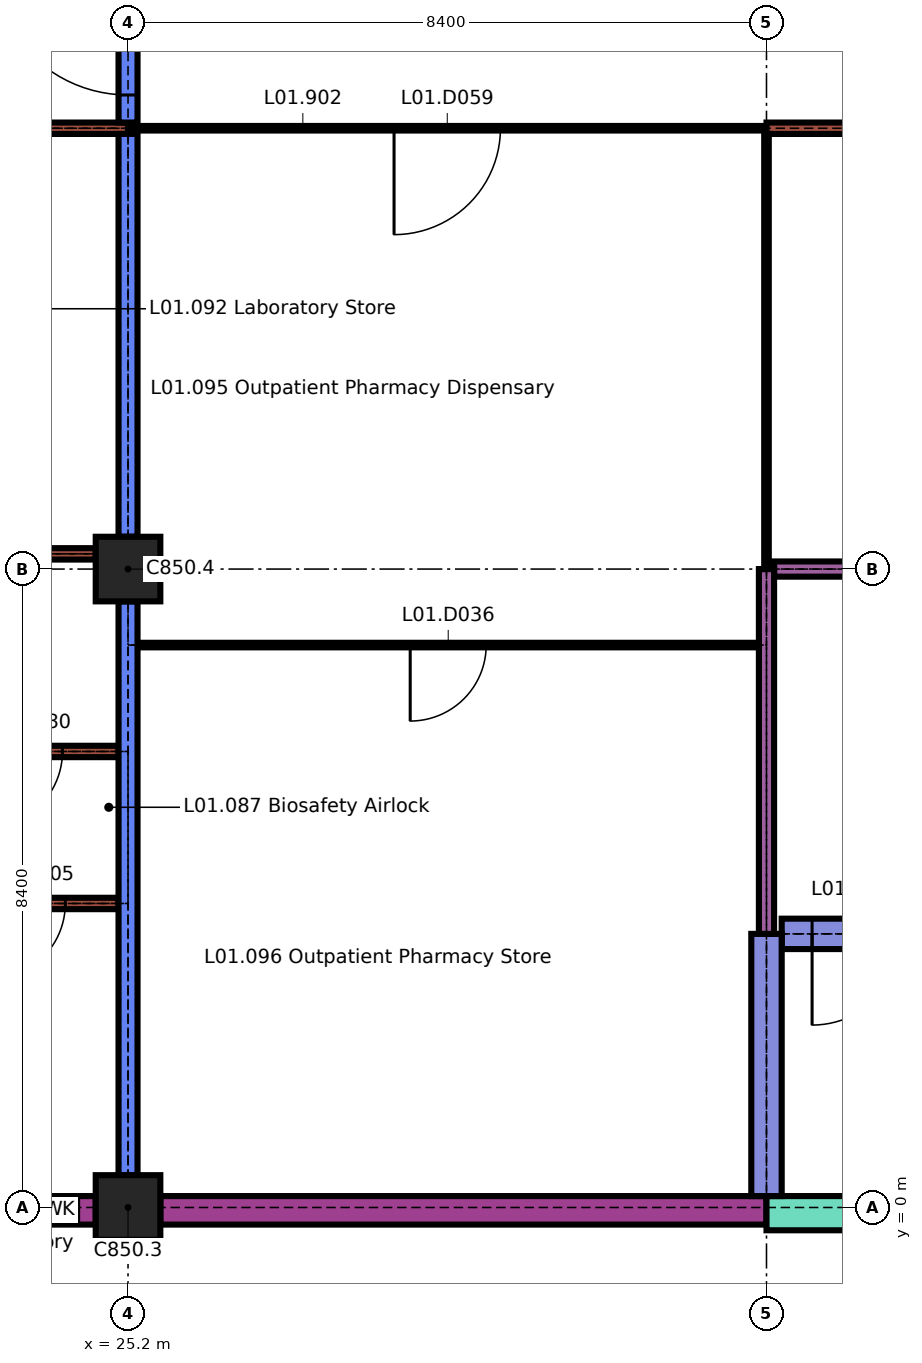
"""IFC4 building model, lengths in metres.
Left out: names, types, materials, properties, quantities, classifications, styles, units other than length and angle.
Written with IfcOpenShell. Run it as: python <this file> out.ifc"""

import sys

from ifc_helpers import new_model, si_unit, direction, frame, frame_2d, origin, origin_2d, place, context, subcontext, project, spatial, rectangle, extrude, element, fill, save


model = new_model("IFC4")
c1 = context("Model", 3, precision=1e-05, world=origin(), true_north=direction((0.0, 1.0)))
c2 = subcontext(c1, "Body", "Model", "MODEL_VIEW")
j1 = project(units=[si_unit("LENGTHUNIT", "METRE"), si_unit("PLANEANGLEUNIT", "RADIAN")], contexts=[c1])
p1 = place(None, origin())
s1 = spatial("IfcSite", under=j1, at=p1, CompositionType="ELEMENT")
p2 = place(p1, origin())
s2 = spatial("IfcBuilding", under=s1, at=p2, CompositionType="ELEMENT")
p3 = place(p2, frame((0.0, 0.0, 4.5)))
s3 = spatial("IfcBuildingStorey", under=s2, at=p3, CompositionType="ELEMENT", Elevation=4.5)
for number, where, z_axis, x_axis in (
    (1, (25.2, 0.0, 0.0), (0.0, 0.0, 1.0), (1.0, 0.0, 0.0)),
    (2, (25.2, 8.4, 0.0), (0.0, 0.0, 1.0), (1.0, 0.0, 0.0)),
):
    element("IfcColumn", number, at=place(p3, frame(where, z_axis=z_axis, x_axis=x_axis)), inside=s3, PredefinedType="COLUMN", context=c2, shape_type="SweptSolid", body=[
        extrude(rectangle(XDim=0.85, YDim=0.85, at=origin_2d()), origin(), (0.0, 0.0, 1.0), 3.45),
    ])
p4 = place(p3, frame((22.6, -0.038, 0.0), z_axis=(0.0, 0.0, 1.0), x_axis=(1.0, 0.0, 0.0)))
e3 = element("IfcWall", 3, at=p4, inside=s3, PredefinedType="SOLIDWALL", context=c2, shape_type="SweptSolid", body=[
    extrude(rectangle(XDim=2.175, YDim=0.375, at=frame_2d((1.087, 0.0))), origin(), (0.0, 0.0, 1.0), 3.15),
])
p5 = place(p4, frame((0.45, 0.0, 1.05)))
e4 = element("IfcOpeningElement", 4, at=p5, cuts=e3, PredefinedType="OPENING", context=c2, shape_type="SweptSolid", body=[
    extrude(rectangle(XDim=1.5, YDim=1.2, at=frame_2d((0.75, 0.6))), frame((0.0, 0.198, 0.0), z_axis=(0.0, -1.0, 0.0), x_axis=(1.0, 0.0, 0.0)), (0.0, 0.0, 1.0), 0.395),
])
p6 = place(p3, frame((25.625, -0.038, 0.0), z_axis=(0.0, 0.0, 1.0), x_axis=(1.0, 0.0, 0.0)))
e5 = element("IfcWall", 5, at=p6, inside=s3, PredefinedType="SOLIDWALL", context=c2, shape_type="SweptSolid", body=[
    extrude(rectangle(XDim=7.975, YDim=0.375, at=frame_2d((3.988, 0.0))), origin(), (0.0, 0.0, 1.0), 3.15),
])
p7 = place(p3, frame((33.6, -0.075, 0.0), z_axis=(0.0, 0.0, 1.0), x_axis=(1.0, 0.0, 0.0)))
e6 = element("IfcWall", 6, at=p7, inside=s3, PredefinedType="SOLIDWALL", context=c2, shape_type="SweptSolid", body=[
    extrude(rectangle(XDim=3.15, YDim=0.45, at=frame_2d((1.575, 0.0))), origin(), (0.0, 0.0, 1.0), 3.45),
])
p8 = place(p3, frame((33.8, 3.6, 0.0), z_axis=(0.0, 0.0, 1.0), x_axis=(1.0, 0.0, 0.0)))
e7 = element("IfcWall", 7, at=p8, inside=s3, PredefinedType="SHEAR", context=c2, shape_type="SweptSolid", body=[
    extrude(rectangle(XDim=8.0, YDim=0.4, at=frame_2d((4.0, 0.0))), origin(), (0.0, 0.0, 1.0), 3.45),
])
p9 = place(p8, frame((0.4, 0.0, 0.0)))
e8 = element("IfcOpeningElement", 8, at=p9, cuts=e7, PredefinedType="OPENING", context=c2, shape_type="SweptSolid", body=[
    extrude(rectangle(XDim=1.2, YDim=2.1, at=frame_2d((0.6, 1.05))), frame((0.0, 0.21, 0.0), z_axis=(0.0, -1.0, 0.0), x_axis=(1.0, 0.0, 0.0)), (0.0, 0.0, 1.0), 0.42),
])
p10 = place(p3, frame((22.675, 4.0, 0.0), z_axis=(0.0, 0.0, 1.0), x_axis=(1.0, 0.0, 0.0)))
e9 = element("IfcWall", 9, at=p10, inside=s3, PredefinedType="PARTITIONING", context=c2, shape_type="SweptSolid", body=[
    extrude(rectangle(XDim=2.4, YDim=0.15, at=frame_2d((1.2, 0.0))), origin(), (0.0, 0.0, 1.0), 3.45),
])
p11 = place(p10, frame((0.7, 0.0, 0.0)))
e10 = element("IfcOpeningElement", 10, at=p11, cuts=e9, PredefinedType="OPENING", context=c2, shape_type="SweptSolid", body=[
    extrude(rectangle(XDim=1.0, YDim=2.1, at=frame_2d((0.5, 1.05))), frame((0.0, 0.085, 0.0), z_axis=(0.0, -1.0, 0.0), x_axis=(1.0, 0.0, 0.0)), (0.0, 0.0, 1.0), 0.17),
])
p12 = place(p3, frame((0.15, 6.0, 0.0), z_axis=(0.0, 0.0, 1.0), x_axis=(1.0, 0.0, 0.0)))
e11 = element("IfcWall", 11, at=p12, inside=s3, PredefinedType="PARTITIONING", context=c2, shape_type="SweptSolid", body=[
    extrude(rectangle(XDim=24.925, YDim=0.15, at=frame_2d((12.462, 0.0))), origin(), (0.0, 0.0, 1.0), 3.45),
])
p13 = place(p12, frame((3.625, 0.0, 0.0)))
e12 = element("IfcOpeningElement", 12, at=p13, cuts=e11, PredefinedType="OPENING", context=c2, shape_type="SweptSolid", body=[
    extrude(rectangle(XDim=1.0, YDim=2.1, at=frame_2d((0.5, 1.05))), frame((0.0, 0.085, 0.0), z_axis=(0.0, -1.0, 0.0), x_axis=(1.0, 0.0, 0.0)), (0.0, 0.0, 1.0), 0.17),
])
p14 = place(p12, frame((11.95, 0.0, 0.0)))
e13 = element("IfcOpeningElement", 13, at=p14, cuts=e11, PredefinedType="OPENING", context=c2, shape_type="SweptSolid", body=[
    extrude(rectangle(XDim=1.0, YDim=2.1, at=frame_2d((0.5, 1.05))), frame((0.0, 0.085, 0.0), z_axis=(0.0, -1.0, 0.0), x_axis=(1.0, 0.0, 0.0)), (0.0, 0.0, 1.0), 0.17),
])
p15 = place(p12, frame((19.05, 0.0, 0.0)))
e14 = element("IfcOpeningElement", 14, at=p15, cuts=e11, PredefinedType="OPENING", context=c2, shape_type="SweptSolid", body=[
    extrude(rectangle(XDim=1.0, YDim=2.1, at=frame_2d((0.5, 1.05))), frame((0.0, 0.085, 0.0), z_axis=(0.0, -1.0, 0.0), x_axis=(1.0, 0.0, 0.0)), (0.0, 0.0, 1.0), 0.17),
])
p16 = place(p12, frame((23.188, 0.0, 0.0)))
e15 = element("IfcOpeningElement", 15, at=p16, cuts=e11, PredefinedType="OPENING", context=c2, shape_type="SweptSolid", body=[
    extrude(rectangle(XDim=1.0, YDim=2.1, at=frame_2d((0.5, 1.05))), frame((0.0, 0.085, 0.0), z_axis=(0.0, -1.0, 0.0), x_axis=(1.0, 0.0, 0.0)), (0.0, 0.0, 1.0), 0.17),
])
p17 = place(p3, frame((25.325, 7.4, 0.0), z_axis=(0.0, 0.0, 1.0), x_axis=(1.0, 0.0, 0.0)))
e16 = element("IfcWall", 16, at=p17, inside=s3, PredefinedType="PARTITIONING", context=c2, shape_type="SweptSolid", body=[
    extrude(rectangle(XDim=8.175, YDim=0.06, at=frame_2d((4.087, 0.0))), origin(), (0.0, 0.0, 1.0), 3.45),
])
p18 = place(p17, frame((3.587, 0.0, 0.0)))
e17 = element("IfcOpeningElement", 17, at=p18, cuts=e16, PredefinedType="OPENING", context=c2, shape_type="SweptSolid", body=[
    extrude(rectangle(XDim=1.0, YDim=2.1, at=frame_2d((0.5, 1.05))), frame((0.0, 0.04, 0.0), z_axis=(0.0, -1.0, 0.0), x_axis=(1.0, 0.0, 0.0)), (0.0, 0.0, 1.0), 0.08),
])
p19 = place(p3, frame((33.7, 8.4, 0.0), z_axis=(0.0, 0.0, 1.0), x_axis=(1.0, 0.0, 0.0)))
e18 = element("IfcWall", 18, at=p19, inside=s3, PredefinedType="PARTITIONING", context=c2, shape_type="SweptSolid", body=[
    extrude(rectangle(XDim=8.4, YDim=0.2, at=frame_2d((4.2, 0.0))), origin(), (0.0, 0.0, 1.0), 3.45),
])
p20 = place(p19, frame((3.45, 0.0, 0.0)))
e19 = element("IfcOpeningElement", 19, at=p20, cuts=e18, PredefinedType="OPENING", context=c2, shape_type="SweptSolid", body=[
    extrude(rectangle(XDim=1.4, YDim=2.1, at=frame_2d((0.7, 1.05))), frame((0.0, 0.11, 0.0), z_axis=(0.0, -1.0, 0.0), x_axis=(1.0, 0.0, 0.0)), (0.0, 0.0, 1.0), 0.22),
])
p21 = place(p3, frame((17.225, 8.6, 0.0), z_axis=(0.0, 0.0, 1.0), x_axis=(1.0, 0.0, 0.0)))
e20 = element("IfcWall", 20, at=p21, inside=s3, PredefinedType="PARTITIONING", context=c2, shape_type="SweptSolid", body=[
    extrude(rectangle(XDim=7.55, YDim=0.15, at=frame_2d((3.775, 0.0))), origin(), (0.0, 0.0, 1.0), 3.45),
])
p22 = place(p21, frame((2.975, 0.0, 0.0)))
e21 = element("IfcOpeningElement", 21, at=p22, cuts=e20, PredefinedType="OPENING", context=c2, shape_type="SweptSolid", body=[
    extrude(rectangle(XDim=1.0, YDim=2.1, at=frame_2d((0.5, 1.05))), frame((0.0, 0.085, 0.0), z_axis=(0.0, -1.0, 0.0), x_axis=(1.0, 0.0, 0.0)), (0.0, 0.0, 1.0), 0.17),
])
p23 = place(p21, frame((5.762, 0.0, 0.0)))
e22 = element("IfcOpeningElement", 22, at=p23, cuts=e20, PredefinedType="OPENING", context=c2, shape_type="SweptSolid", body=[
    extrude(rectangle(XDim=1.0, YDim=2.1, at=frame_2d((0.5, 1.05))), frame((0.0, 0.085, 0.0), z_axis=(0.0, -1.0, 0.0), x_axis=(1.0, 0.0, 0.0)), (0.0, 0.0, 1.0), 0.17),
])
p24 = place(p3, frame((13.525, 14.2, 0.0), z_axis=(0.0, 0.0, 1.0), x_axis=(1.0, 0.0, 0.0)))
e23 = element("IfcWall", 23, at=p24, inside=s3, PredefinedType="PARTITIONING", context=c2, shape_type="SweptSolid", body=[
    extrude(rectangle(XDim=11.675, YDim=0.15, at=frame_2d((5.837, 0.0))), origin(), (0.0, 0.0, 1.0), 3.45),
])
p25 = place(p3, frame((25.2, 14.2, 0.0), z_axis=(0.0, 0.0, 1.0), x_axis=(1.0, 0.0, 0.0)))
e24 = element("IfcWall", 24, at=p25, inside=s3, PredefinedType="PARTITIONING", context=c2, shape_type="SweptSolid", body=[
    extrude(rectangle(XDim=8.4, YDim=0.06, at=frame_2d((4.2, 0.0))), origin(), (0.0, 0.0, 1.0), 3.45),
])
p26 = place(p25, frame((3.5, 0.0, 0.0)))
e25 = element("IfcOpeningElement", 25, at=p26, cuts=e24, PredefinedType="OPENING", context=c2, shape_type="SweptSolid", body=[
    extrude(rectangle(XDim=1.4, YDim=2.1, at=frame_2d((0.7, 1.05))), frame((0.0, 0.04, 0.0), z_axis=(0.0, -1.0, 0.0), x_axis=(1.0, 0.0, 0.0)), (0.0, 0.0, 1.0), 0.08),
])
p27 = place(p25, frame((1.4, 0.0, 0.9)))
e26 = element("IfcOpeningElement", 26, at=p27, cuts=e24, PredefinedType="OPENING", context=c2, shape_type="SweptSolid", body=[
    extrude(rectangle(XDim=1.8, YDim=1.0, at=frame_2d((0.9, 0.5))), frame((0.0, 0.04, 0.0), z_axis=(0.0, -1.0, 0.0), x_axis=(1.0, 0.0, 0.0)), (0.0, 0.0, 1.0), 0.08),
])
p28 = place(p3, frame((33.6, 14.2, 0.0), z_axis=(0.0, 0.0, 1.0), x_axis=(1.0, 0.0, 0.0)))
e27 = element("IfcWall", 27, at=p28, inside=s3, PredefinedType="PARTITIONING", context=c2, shape_type="SweptSolid", body=[
    extrude(rectangle(XDim=19.6, YDim=0.15, at=frame_2d((9.8, 0.0))), origin(), (0.0, 0.0, 1.0), 3.45),
])
p29 = place(p28, frame((3.5, 0.0, 0.0)))
e28 = element("IfcOpeningElement", 28, at=p29, cuts=e27, PredefinedType="OPENING", context=c2, shape_type="SweptSolid", body=[
    extrude(rectangle(XDim=1.4, YDim=2.1, at=frame_2d((0.7, 1.05))), frame((0.0, 0.085, 0.0), z_axis=(0.0, -1.0, 0.0), x_axis=(1.0, 0.0, 0.0)), (0.0, 0.0, 1.0), 0.17),
])
p30 = place(p28, frame((11.9, 0.0, 0.0)))
e29 = element("IfcOpeningElement", 29, at=p30, cuts=e27, PredefinedType="OPENING", context=c2, shape_type="SweptSolid", body=[
    extrude(rectangle(XDim=1.4, YDim=2.1, at=frame_2d((0.7, 1.05))), frame((0.0, 0.085, 0.0), z_axis=(0.0, -1.0, 0.0), x_axis=(1.0, 0.0, 0.0)), (0.0, 0.0, 1.0), 0.17),
])
p31 = place(p28, frame((17.45, 0.0, 0.9)))
e30 = element("IfcOpeningElement", 30, at=p31, cuts=e27, PredefinedType="OPENING", context=c2, shape_type="SweptSolid", body=[
    extrude(rectangle(XDim=1.5, YDim=1.0, at=frame_2d((0.75, 0.5))), frame((0.0, 0.085, 0.0), z_axis=(0.0, -1.0, 0.0), x_axis=(1.0, 0.0, 0.0)), (0.0, 0.0, 1.0), 0.17),
])
p32 = place(p3, frame((25.2, 0.425, 0.0), z_axis=(0.0, 0.0, 1.0), x_axis=(0.0, 1.0, 0.0)))
e31 = element("IfcWall", 31, at=p32, inside=s3, PredefinedType="SOLIDWALL", context=c2, shape_type="SweptSolid", body=[
    extrude(rectangle(XDim=7.55, YDim=0.25, at=frame_2d((3.775, 0.0))), origin(), (0.0, 0.0, 1.0), 3.45),
])
p33 = place(p3, frame((25.2, 8.825, 0.0), z_axis=(0.0, 0.0, 1.0), x_axis=(0.0, 1.0, 0.0)))
e32 = element("IfcWall", 32, at=p33, inside=s3, PredefinedType="SOLIDWALL", context=c2, shape_type="SweptSolid", body=[
    extrude(rectangle(XDim=5.3, YDim=0.25, at=frame_2d((2.65, 0.0))), origin(), (0.0, 0.0, 1.0), 3.45),
])
p34 = place(p3, frame((25.2, 14.275, 0.0), z_axis=(0.0, 0.0, 1.0), x_axis=(0.0, 1.0, 0.0)))
e33 = element("IfcWall", 33, at=p34, inside=s3, PredefinedType="SOLIDWALL", context=c2, shape_type="SweptSolid", body=[
    extrude(rectangle(XDim=7.325, YDim=0.25, at=frame_2d((3.663, 0.0))), origin(), (0.0, 0.0, 1.0), 3.45),
])
p35 = place(p34, frame((0.363, 0.0, 0.0)))
e34 = element("IfcOpeningElement", 34, at=p35, cuts=e33, PredefinedType="OPENING", context=c2, shape_type="SweptSolid", body=[
    extrude(rectangle(XDim=1.8, YDim=2.4, at=frame_2d((0.9, 1.2))), frame((0.0, 0.135, 0.0), z_axis=(0.0, -1.0, 0.0), x_axis=(1.0, 0.0, 0.0)), (0.0, 0.0, 1.0), 0.27),
])
p36 = place(p34, frame((4.025, 0.0, 0.0)))
e35 = element("IfcOpeningElement", 35, at=p36, cuts=e33, PredefinedType="OPENING", context=c2, shape_type="SweptSolid", body=[
    extrude(rectangle(XDim=1.8, YDim=2.4, at=frame_2d((0.9, 1.2))), frame((0.0, 0.135, 0.0), z_axis=(0.0, -1.0, 0.0), x_axis=(1.0, 0.0, 0.0)), (0.0, 0.0, 1.0), 0.27),
])
p37 = place(p3, frame((33.6, 0.15, 0.0), z_axis=(0.0, 0.0, 1.0), x_axis=(0.0, 1.0, 0.0)))
e36 = element("IfcWall", 36, at=p37, inside=s3, PredefinedType="SHEAR", context=c2, shape_type="SweptSolid", body=[
    extrude(rectangle(XDim=3.45, YDim=0.4, at=frame_2d((1.725, 0.0))), origin(), (0.0, 0.0, 1.0), 3.45),
])
p38 = place(p3, frame((33.6, 3.6, 0.0), z_axis=(0.0, 0.0, 1.0), x_axis=(0.0, 1.0, 0.0)))
e37 = element("IfcWall", 37, at=p38, inside=s3, PredefinedType="PARTITIONING", context=c2, shape_type="SweptSolid", body=[
    extrude(rectangle(XDim=4.8, YDim=0.2, at=frame_2d((2.4, 0.0))), origin(), (0.0, 0.0, 1.0), 3.45),
])
p39 = place(p3, frame((33.6, 8.4, 0.0), z_axis=(0.0, 0.0, 1.0), x_axis=(0.0, 1.0, 0.0)))
e38 = element("IfcWall", 38, at=p39, inside=s3, PredefinedType="PARTITIONING", context=c2, shape_type="SweptSolid", body=[
    extrude(rectangle(XDim=5.725, YDim=0.06, at=frame_2d((2.863, 0.0))), origin(), (0.0, 0.0, 1.0), 3.45),
])
p40 = place(p5, origin())
e39 = element("IfcWindow", 39, at=p40, inside=s3, PartitioningType="SINGLE_PANEL", PredefinedType="WINDOW", context=c2, shape_type="SweptSolid", body=[
    extrude(rectangle(XDim=1.5, YDim=1.2, at=frame_2d((0.75, 0.6))), frame((0.0, 0.03, 0.0), z_axis=(0.0, -1.0, 0.0), x_axis=(1.0, 0.0, 0.0)), (0.0, 0.0, 1.0), 0.06),
])
fill(e4, e39)
p41 = place(p9, origin())
e40 = element("IfcDoor", 40, at=p41, inside=s3, OperationType="SINGLE_SWING_LEFT", PredefinedType="DOOR", context=c2, shape_type="SweptSolid", body=[
    extrude(rectangle(XDim=1.2, YDim=2.1, at=frame_2d((0.6, 1.05))), frame((0.0, 0.025, 0.0), z_axis=(0.0, -1.0, 0.0), x_axis=(1.0, 0.0, 0.0)), (0.0, 0.0, 1.0), 0.05),
])
fill(e8, e40)
p42 = place(p11, origin())
e41 = element("IfcDoor", 41, at=p42, inside=s3, OperationType="SINGLE_SWING_LEFT", PredefinedType="DOOR", context=c2, shape_type="SweptSolid", body=[
    extrude(rectangle(XDim=1.0, YDim=2.1, at=frame_2d((0.5, 1.05))), frame((0.0, 0.05, 0.0), z_axis=(0.0, -1.0, 0.0), x_axis=(1.0, 0.0, 0.0)), (0.0, 0.0, 1.0), 0.1),
])
fill(e10, e41)
p43 = place(p16, origin())
e42 = element("IfcDoor", 42, at=p43, inside=s3, OperationType="SINGLE_SWING_LEFT", PredefinedType="DOOR", context=c2, shape_type="SweptSolid", body=[
    extrude(rectangle(XDim=1.0, YDim=2.1, at=frame_2d((0.5, 1.05))), frame((0.0, 0.05, 0.0), z_axis=(0.0, -1.0, 0.0), x_axis=(1.0, 0.0, 0.0)), (0.0, 0.0, 1.0), 0.1),
])
fill(e15, e42)
p44 = place(p18, origin())
e43 = element("IfcDoor", 43, at=p44, inside=s3, OperationType="SINGLE_SWING_LEFT", PredefinedType="DOOR", context=c2, shape_type="SweptSolid", body=[
    extrude(rectangle(XDim=1.0, YDim=2.1, at=frame_2d((0.5, 1.05))), frame((0.0, 0.025, 0.0), z_axis=(0.0, -1.0, 0.0), x_axis=(1.0, 0.0, 0.0)), (0.0, 0.0, 1.0), 0.05),
])
fill(e17, e43)
p45 = place(p26, origin())
e44 = element("IfcDoor", 44, at=p45, inside=s3, OperationType="SINGLE_SWING_LEFT", PredefinedType="DOOR", context=c2, shape_type="SweptSolid", body=[
    extrude(rectangle(XDim=1.4, YDim=2.1, at=frame_2d((0.7, 1.05))), frame((0.0, 0.025, 0.0), z_axis=(0.0, -1.0, 0.0), x_axis=(1.0, 0.0, 0.0)), (0.0, 0.0, 1.0), 0.05),
])
fill(e25, e44)
p46 = place(p35, origin())
e45 = element("IfcDoor", 45, at=p46, inside=s3, OperationType="SINGLE_SWING_LEFT", PredefinedType="DOOR", context=c2, shape_type="SweptSolid", body=[
    extrude(rectangle(XDim=1.8, YDim=2.4, at=frame_2d((0.9, 1.2))), frame((0.0, 0.03, 0.0), z_axis=(0.0, -1.0, 0.0), x_axis=(1.0, 0.0, 0.0)), (0.0, 0.0, 1.0), 0.06),
])
fill(e34, e45)
p47 = place(p27, origin())
e46 = element("IfcWindow", 46, at=p47, inside=s3, PartitioningType="DOUBLE_PANEL_HORIZONTAL", PredefinedType="WINDOW", context=c2, shape_type="SweptSolid", body=[
    extrude(rectangle(XDim=1.8, YDim=1.0, at=frame_2d((0.9, 0.5))), frame((0.0, 0.03, 0.0), z_axis=(0.0, -1.0, 0.0), x_axis=(1.0, 0.0, 0.0)), (0.0, 0.0, 1.0), 0.06),
])
fill(e26, e46)
save(model, sys.argv[1])
